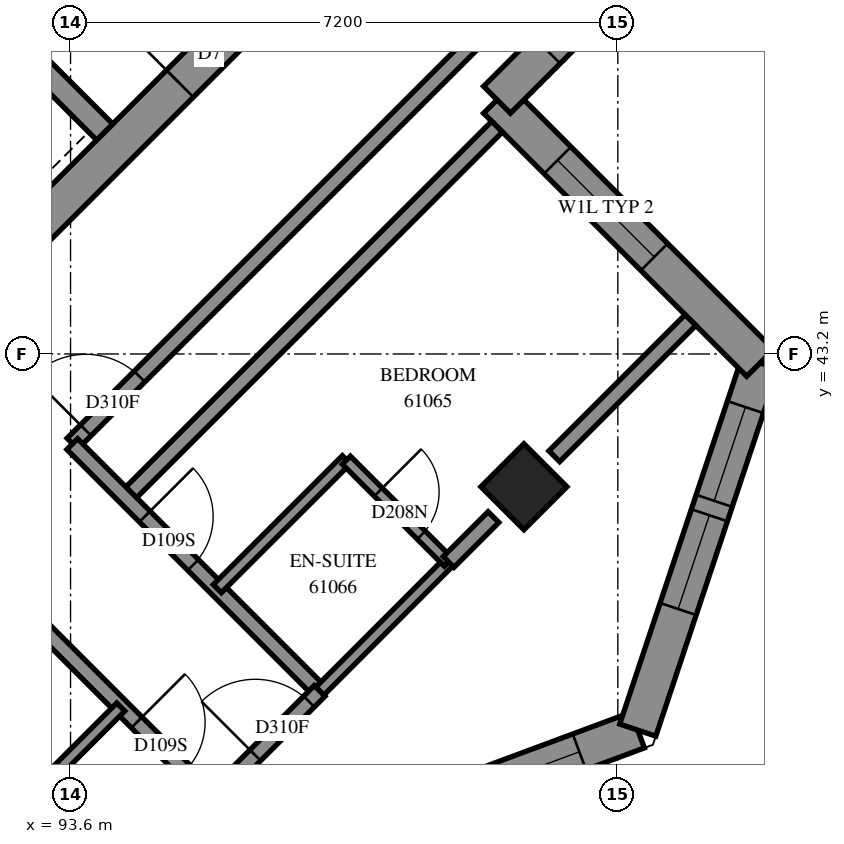
"""IFC4 building model, lengths in metres.
Left out: names, types, materials, properties, quantities, classifications, styles, units other than length and angle.
Written with IfcOpenShell. Run it as: python <this file> out.ifc"""

import sys

from ifc_helpers import new_model, si_unit, direction, frame, frame_2d, origin, origin_2d, place, context, subcontext, project, spatial, polyline, rectangle, outline, extrude, element, fill, save


model = new_model("IFC4")
c1 = context("Model", 3, precision=1e-05, world=origin(), true_north=direction((0.0, 1.0)))
c2 = subcontext(c1, "Body", "Model", "MODEL_VIEW")
j1 = project(units=[si_unit("LENGTHUNIT", "METRE"), si_unit("PLANEANGLEUNIT", "RADIAN")], contexts=[c1])
p1 = place(None, origin())
s1 = spatial("IfcSite", under=j1, at=p1, CompositionType="ELEMENT")
p2 = place(p1, origin())
s2 = spatial("IfcBuilding", under=s1, at=p2, CompositionType="ELEMENT")
p3 = place(p2, frame((0.0, 0.0, 223.6)))
s3 = spatial("IfcBuildingStorey", under=s2, at=p3, CompositionType="ELEMENT", Elevation=223.6)
p4 = place(p3, frame((99.565, 41.453, 0.0), z_axis=(0.0, 0.0, 1.0), x_axis=(0.7071067812, -0.7071067812, 0.0)))
e1 = element("IfcColumn", 1, at=p4, inside=s3, PredefinedType="COLUMN", context=c2, shape_type="SweptSolid", body=[
    extrude(rectangle(XDim=0.8, YDim=0.8, at=origin_2d()), origin(), (0.0, 0.0, 1.0), 3.1),
])
p5 = place(p3, frame((87.013, 38.731, -0.3), z_axis=(0.0, 0.0, 1.0), x_axis=(0.7071067812, 0.7071067812, 0.0)))
e2 = element("IfcWall", 2, at=p5, inside=s3, PredefinedType="SHEAR", context=c2, shape_type="SweptSolid", body=[
    extrude(rectangle(XDim=14.4, YDim=0.5, at=frame_2d((7.2, 0.0))), origin(), (0.0, 0.0, 1.0), 2.7),
])
p6 = place(p5, frame((4.55, 0.0, 0.3)))
e3 = element("IfcOpeningElement", 3, at=p6, cuts=e2, PredefinedType="OPENING", context=c2, shape_type="SweptSolid", body=[
    extrude(rectangle(XDim=1.1, YDim=2.1, at=frame_2d((0.55, 1.05))), frame((0.0, 0.26, 0.0), z_axis=(0.0, -1.0, 0.0), x_axis=(1.0, 0.0, 0.0)), (0.0, 0.0, 1.0), 0.52),
])
p7 = place(p5, frame((11.35, 0.0, 0.3)))
e4 = element("IfcOpeningElement", 4, at=p7, cuts=e2, PredefinedType="OPENING", context=c2, shape_type="SweptSolid", body=[
    extrude(rectangle(XDim=1.1, YDim=2.1, at=frame_2d((0.55, 1.05))), frame((0.0, 0.26, 0.0), z_axis=(0.0, -1.0, 0.0), x_axis=(1.0, 0.0, 0.0)), (0.0, 0.0, 1.0), 0.52),
])
p8 = place(p3, frame((88.958, 51.211, 0.0), z_axis=(0.0, 0.0, 1.0), x_axis=(0.7070998367, -0.7071137256, 0.0)))
e5 = element("IfcWall", 5, at=p8, inside=s3, PredefinedType="SOLIDWALL", context=c2, shape_type="SweptSolid", body=[
    extrude(rectangle(XDim=7.2, YDim=0.3, at=frame_2d((3.6, 0.0))), origin(), (0.0, 0.0, 1.0), 3.1),
])
p9 = place(p3, frame((96.118, 36.415, 0.0), z_axis=(0.0, 0.0, 1.0), x_axis=(0.9374238577, 0.3481903374, 0.0)))
e6 = element("IfcWall", 6, at=p9, inside=s3, PredefinedType="SOLIDWALL", context=c2, shape_type="SweptSolid", body=[
    extrude(outline(polyline([(0.115, -0.25), (5.395, -0.25), (5.155, 0.25), (-0.115, 0.25), (0.115, -0.25)])), origin(), (0.0, 0.0, 1.0), 3.1),
])
p10 = place(p9, frame((1.655, 0.0, 0.45)))
e7 = element("IfcOpeningElement", 7, at=p10, cuts=e6, PredefinedType="OPENING", context=c2, shape_type="SweptSolid", body=[
    extrude(rectangle(XDim=1.3, YDim=2.5, at=frame_2d((0.65, 1.25))), frame((0.0, 0.26, 0.0), z_axis=(0.0, -1.0, 0.0), x_axis=(1.0, 0.0, 0.0)), (0.0, 0.0, 1.0), 0.52),
])
p11 = place(p9, frame((3.155, 0.0, 0.45)))
e8 = element("IfcOpeningElement", 8, at=p11, cuts=e6, PredefinedType="OPENING", context=c2, shape_type="SweptSolid", body=[
    extrude(rectangle(XDim=1.3, YDim=2.5, at=frame_2d((0.65, 1.25))), frame((0.0, 0.26, 0.0), z_axis=(0.0, -1.0, 0.0), x_axis=(1.0, 0.0, 0.0)), (0.0, 0.0, 1.0), 0.52),
])
p12 = place(p3, frame((101.062, 38.252, 0.0), z_axis=(0.0, 0.0, 1.0), x_axis=(0.3162395484, 0.9486793705, 0.0)))
e9 = element("IfcWall", 9, at=p12, inside=s3, PredefinedType="SOLIDWALL", context=c2, shape_type="SweptSolid", body=[
    extrude(outline(polyline([(-0.12, -0.25), (5.247, -0.25), (4.938, 0.25), (0.12, 0.25), (-0.12, -0.25)])), origin(), (0.0, 0.0, 1.0), 3.1),
])
p13 = place(p12, frame((1.68, 0.0, 0.45)))
e10 = element("IfcOpeningElement", 10, at=p13, cuts=e9, PredefinedType="OPENING", context=c2, shape_type="SweptSolid", body=[
    extrude(rectangle(XDim=1.3, YDim=2.5, at=frame_2d((0.65, 1.25))), frame((0.0, 0.26, 0.0), z_axis=(0.0, -1.0, 0.0), x_axis=(1.0, 0.0, 0.0)), (0.0, 0.0, 1.0), 0.52),
])
p14 = place(p12, frame((3.18, 0.0, 0.45)))
e11 = element("IfcOpeningElement", 11, at=p14, cuts=e9, PredefinedType="OPENING", context=c2, shape_type="SweptSolid", body=[
    extrude(rectangle(XDim=1.3, YDim=2.5, at=frame_2d((0.65, 1.25))), frame((0.0, 0.26, 0.0), z_axis=(0.0, -1.0, 0.0), x_axis=(1.0, 0.0, 0.0)), (0.0, 0.0, 1.0), 0.52),
])
p15 = place(p3, frame((102.673, 43.083, 0.0), z_axis=(0.0, 0.0, 1.0), x_axis=(-0.7071067812, 0.7071067812, 0.0)))
e12 = element("IfcWall", 12, at=p15, inside=s3, PredefinedType="SOLIDWALL", context=c2, shape_type="SweptSolid", body=[
    extrude(outline(polyline([(-0.154, -0.25), (4.646, -0.25), (5.146, 0.25), (0.154, 0.25), (-0.154, -0.25)])), origin(), (0.0, 0.0, 1.0), 3.1),
])
p16 = place(p15, frame((1.97, 0.0, 0.6)))
e13 = element("IfcOpeningElement", 13, at=p16, cuts=e12, PredefinedType="OPENING", context=c2, shape_type="SweptSolid", body=[
    extrude(rectangle(XDim=1.8, YDim=1.9, at=frame_2d((0.9, 0.95))), frame((0.0, 0.26, 0.0), z_axis=(0.0, -1.0, 0.0), x_axis=(1.0, 0.0, 0.0)), (0.0, 0.0, 1.0), 0.52),
])
p17 = place(p3, frame((99.211, 46.544, 0.0), z_axis=(0.0, 0.0, 1.0), x_axis=(0.7071152597, 0.7070983025, 0.0)))
e14 = element("IfcWall", 14, at=p17, inside=s3, PredefinedType="SOLIDWALL", context=c2, shape_type="SweptSolid", body=[
    extrude(outline(polyline([(0.25, -0.25), (6.253, -0.25), (5.541, 0.25), (-0.25, 0.25), (0.25, -0.25)])), origin(), (0.0, 0.0, 1.0), 3.1),
])
p18 = place(p17, frame((0.925, 0.0, 0.6)))
e15 = element("IfcOpeningElement", 15, at=p18, cuts=e14, PredefinedType="OPENING", context=c2, shape_type="SweptSolid", body=[
    extrude(rectangle(XDim=1.8, YDim=1.9, at=frame_2d((0.9, 0.95))), frame((0.0, 0.26, 0.0), z_axis=(0.0, -1.0, 0.0), x_axis=(1.0, 0.0, 0.0)), (0.0, 0.0, 1.0), 0.52),
])
p19 = place(p17, frame((3.996, 0.0, 0.6)))
e16 = element("IfcOpeningElement", 16, at=p19, cuts=e14, PredefinedType="OPENING", context=c2, shape_type="SweptSolid", body=[
    extrude(rectangle(XDim=1.2, YDim=1.9, at=frame_2d((0.6, 0.95))), frame((0.0, 0.26, 0.0), z_axis=(0.0, -1.0, 0.0), x_axis=(1.0, 0.0, 0.0)), (0.0, 0.0, 1.0), 0.52),
])
p20 = place(p3, frame((93.625, 42.021, 0.0), z_axis=(0.0, 0.0, 1.0), x_axis=(0.7071067812, 0.7071067812, 0.0)))
e17 = element("IfcWall", 17, at=p20, inside=s3, PredefinedType="PARTITIONING", context=c2, shape_type="SweptSolid", body=[
    extrude(rectangle(XDim=9.998, YDim=0.2, at=frame_2d((4.999, 0.0))), origin(), (0.0, 0.0, 1.0), 3.1),
])
p21 = place(p20, frame((0.248, 0.0, 0.0)))
e18 = element("IfcOpeningElement", 18, at=p21, cuts=e17, PredefinedType="OPENING", context=c2, shape_type="SweptSolid", body=[
    extrude(rectangle(XDim=1.0, YDim=2.1, at=frame_2d((0.5, 1.05))), frame((0.0, 0.11, 0.0), z_axis=(0.0, -1.0, 0.0), x_axis=(1.0, 0.0, 0.0)), (0.0, 0.0, 1.0), 0.22),
])
p22 = place(p3, frame((94.331, 41.313, 0.0), z_axis=(0.0, 0.0, 1.0), x_axis=(0.7072516979, 0.7069618347, 0.0)))
e19 = element("IfcWall", 19, at=p22, inside=s3, PredefinedType="PARTITIONING", context=c2, shape_type="SweptSolid", body=[
    extrude(rectangle(XDim=6.9, YDim=0.2, at=frame_2d((3.45, 0.0))), origin(), (0.0, 0.0, 1.0), 3.1),
])
p23 = place(p3, frame((93.623, 42.015, 0.0), z_axis=(0.0, 0.0, 1.0), x_axis=(0.7071067812, -0.7071067812, 0.0)))
e20 = element("IfcWall", 20, at=p23, inside=s3, PredefinedType="PARTITIONING", context=c2, shape_type="SweptSolid", body=[
    extrude(rectangle(XDim=4.599, YDim=0.2, at=frame_2d((2.3, 0.0))), origin(), (0.0, 0.0, 1.0), 3.1),
])
p24 = place(p23, frame((1.349, 0.0, 0.0)))
e21 = element("IfcOpeningElement", 21, at=p24, cuts=e20, PredefinedType="OPENING", context=c2, shape_type="SweptSolid", body=[
    extrude(rectangle(XDim=0.9, YDim=2.1, at=frame_2d((0.45, 1.05))), frame((0.0, 0.11, 0.0), z_axis=(0.0, -1.0, 0.0), x_axis=(1.0, 0.0, 0.0)), (0.0, 0.0, 1.0), 0.22),
])
p25 = place(p3, frame((92.216, 40.608, 0.0), z_axis=(0.0, 0.0, 1.0), x_axis=(0.7071067812, -0.7071067812, 0.0)))
e22 = element("IfcWall", 22, at=p25, inside=s3, PredefinedType="PARTITIONING", context=c2, shape_type="SweptSolid", body=[
    extrude(rectangle(XDim=4.599, YDim=0.2, at=frame_2d((2.3, 0.0))), origin(), (0.0, 0.0, 1.0), 3.1),
])
p26 = place(p25, frame((3.189, 0.0, 0.0)))
e23 = element("IfcOpeningElement", 23, at=p26, cuts=e22, PredefinedType="OPENING", context=c2, shape_type="SweptSolid", body=[
    extrude(rectangle(XDim=0.9, YDim=2.1, at=frame_2d((0.45, 1.05))), frame((0.0, 0.11, 0.0), z_axis=(0.0, -1.0, 0.0), x_axis=(1.0, 0.0, 0.0)), (0.0, 0.0, 1.0), 0.22),
])
p27 = place(p3, frame((99.964, 41.854, 0.0), z_axis=(0.0, 0.0, 1.0), x_axis=(0.7071265121, 0.7070870497, 0.0)))
e24 = element("IfcWall", 24, at=p27, inside=s3, PredefinedType="PARTITIONING", context=c2, shape_type="SweptSolid", body=[
    extrude(rectangle(XDim=2.534, YDim=0.2, at=frame_2d((1.267, 0.0))), origin(), (0.0, 0.0, 1.0), 3.1),
])
p28 = place(p3, frame((92.563, 36.857, 0.0), z_axis=(0.0, 0.0, 1.0), x_axis=(0.7071067812, 0.7071067812, 0.0)))
e25 = element("IfcWall", 25, at=p28, inside=s3, PredefinedType="PARTITIONING", context=c2, shape_type="SweptSolid", body=[
    extrude(rectangle(XDim=2.401, YDim=0.15, at=frame_2d((1.201, 0.0))), origin(), (0.0, 0.0, 1.0), 3.1),
])
p29 = place(p3, frame((96.879, 38.764, 0.0), z_axis=(0.0, 0.0, 1.0), x_axis=(0.706689978, 0.7075233388, 0.0)))
e26 = element("IfcWall", 26, at=p29, inside=s3, PredefinedType="PARTITIONING", context=c2, shape_type="SweptSolid", body=[
    extrude(rectangle(XDim=2.4, YDim=0.15, at=frame_2d((1.2, 0.0))), origin(), (0.0, 0.0, 1.0), 2.6),
])
p30 = place(p3, frame((95.531, 40.113, 0.0), z_axis=(0.0, 0.0, 1.0), x_axis=(0.7075233388, 0.706689978, 0.0)))
e27 = element("IfcWall", 27, at=p30, inside=s3, PredefinedType="PARTITIONING", context=c2, shape_type="SweptSolid", body=[
    extrude(rectangle(XDim=2.4, YDim=0.15, at=frame_2d((1.2, 0.0))), origin(), (0.0, 0.0, 1.0), 3.1),
])
p31 = place(p3, frame((95.463, 37.353, 0.0), z_axis=(0.0, 0.0, 1.0), x_axis=(0.7071067812, 0.7071067812, 0.0)))
e28 = element("IfcWall", 28, at=p31, inside=s3, PredefinedType="PARTITIONING", context=c2, shape_type="SweptSolid", body=[
    extrude(rectangle(XDim=2.0, YDim=0.2, at=frame_2d((1.0, 0.0))), origin(), (0.0, 0.0, 1.0), 2.6),
])
p32 = place(p31, frame((0.802, 0.0, 0.0)))
e29 = element("IfcOpeningElement", 29, at=p32, cuts=e28, PredefinedType="OPENING", context=c2, shape_type="SweptSolid", body=[
    extrude(rectangle(XDim=1.0, YDim=2.1, at=frame_2d((0.5, 1.05))), frame((0.0, 0.11, 0.0), z_axis=(0.0, -1.0, 0.0), x_axis=(1.0, 0.0, 0.0)), (0.0, 0.0, 1.0), 0.22),
])
p33 = place(p3, frame((97.229, 41.803, 0.0), z_axis=(0.0, 0.0, 1.0), x_axis=(0.7071067812, -0.7071067812, 0.0)))
e30 = element("IfcWall", 30, at=p33, inside=s3, PredefinedType="PARTITIONING", context=c2, shape_type="SweptSolid", body=[
    extrude(rectangle(XDim=1.898, YDim=0.15, at=frame_2d((0.949, 0.0))), origin(), (0.0, 0.0, 1.0), 3.1),
])
p34 = place(p33, frame((0.594, 0.0, 0.0)))
e31 = element("IfcOpeningElement", 31, at=p34, cuts=e30, PredefinedType="OPENING", context=c2, shape_type="SweptSolid", body=[
    extrude(rectangle(XDim=0.8, YDim=2.1, at=frame_2d((0.4, 1.05))), frame((0.0, 0.085, 0.0), z_axis=(0.0, -1.0, 0.0), x_axis=(1.0, 0.0, 0.0)), (0.0, 0.0, 1.0), 0.17),
])
p35 = place(p3, frame((98.574, 40.464, 0.0), z_axis=(0.0, 0.0, 1.0), x_axis=(0.7071067812, 0.7071067812, 0.0)))
e32 = element("IfcWall", 32, at=p35, inside=s3, PredefinedType="PARTITIONING", context=c2, shape_type="SweptSolid", body=[
    extrude(rectangle(XDim=0.834, YDim=0.2, at=frame_2d((0.417, 0.0))), origin(), (0.0, 0.0, 1.0), 2.6),
])
p36 = place(p11, origin())
e33 = element("IfcWindow", 33, at=p36, inside=s3, PartitioningType="SINGLE_PANEL", PredefinedType="WINDOW", context=c2, shape_type="SweptSolid", body=[
    extrude(rectangle(XDim=1.3, YDim=2.5, at=frame_2d((0.65, 1.25))), frame((0.0, 0.18, 0.0), z_axis=(0.0, -1.0, 0.0), x_axis=(1.0, 0.0, 0.0)), (0.0, 0.0, 1.0), 0.06),
])
fill(e8, e33)
p37 = place(p13, origin())
e34 = element("IfcWindow", 34, at=p37, inside=s3, PartitioningType="SINGLE_PANEL", PredefinedType="WINDOW", context=c2, shape_type="SweptSolid", body=[
    extrude(rectangle(XDim=1.3, YDim=2.5, at=frame_2d((0.65, 1.25))), frame((0.0, 0.18, 0.0), z_axis=(0.0, -1.0, 0.0), x_axis=(1.0, 0.0, 0.0)), (0.0, 0.0, 1.0), 0.06),
])
fill(e10, e34)
p38 = place(p14, origin())
e35 = element("IfcWindow", 35, at=p38, inside=s3, PartitioningType="SINGLE_PANEL", PredefinedType="WINDOW", context=c2, shape_type="SweptSolid", body=[
    extrude(rectangle(XDim=1.3, YDim=2.5, at=frame_2d((0.65, 1.25))), frame((0.0, 0.18, 0.0), z_axis=(0.0, -1.0, 0.0), x_axis=(1.0, 0.0, 0.0)), (0.0, 0.0, 1.0), 0.06),
])
fill(e11, e35)
p39 = place(p16, origin())
e36 = element("IfcWindow", 36, at=p39, inside=s3, PartitioningType="SINGLE_PANEL", PredefinedType="WINDOW", context=c2, shape_type="SweptSolid", body=[
    extrude(rectangle(XDim=1.8, YDim=1.9, at=frame_2d((0.9, 0.95))), frame((0.0, 0.18, 0.0), z_axis=(0.0, -1.0, 0.0), x_axis=(1.0, 0.0, 0.0)), (0.0, 0.0, 1.0), 0.06),
])
fill(e13, e36)
p40 = place(p7, origin())
e37 = element("IfcDoor", 37, at=p40, inside=s3, OperationType="SINGLE_SWING_RIGHT", PredefinedType="DOOR", context=c2, shape_type="SweptSolid", body=[
    extrude(rectangle(XDim=1.1, YDim=2.1, at=frame_2d((0.55, 1.05))), frame((0.0, 0.025, 0.0), z_axis=(0.0, -1.0, 0.0), x_axis=(1.0, 0.0, 0.0)), (0.0, 0.0, 1.0), 0.05),
])
fill(e4, e37)
p41 = place(p21, origin())
e38 = element("IfcDoor", 38, at=p41, inside=s3, OperationType="SINGLE_SWING_LEFT", PredefinedType="DOOR", context=c2, shape_type="SweptSolid", body=[
    extrude(rectangle(XDim=1.0, YDim=2.1, at=frame_2d((0.5, 1.05))), frame((0.0, 0.025, 0.0), z_axis=(0.0, -1.0, 0.0), x_axis=(1.0, 0.0, 0.0)), (0.0, 0.0, 1.0), 0.05),
])
fill(e18, e38)
p42 = place(p24, origin())
e39 = element("IfcDoor", 39, at=p42, inside=s3, OperationType="SINGLE_SWING_RIGHT", PredefinedType="DOOR", context=c2, shape_type="SweptSolid", body=[
    extrude(rectangle(XDim=0.9, YDim=2.1, at=frame_2d((0.45, 1.05))), frame((0.0, 0.025, 0.0), z_axis=(0.0, -1.0, 0.0), x_axis=(1.0, 0.0, 0.0)), (0.0, 0.0, 1.0), 0.05),
])
fill(e21, e39)
p43 = place(p34, origin())
e40 = element("IfcDoor", 40, at=p43, inside=s3, OperationType="SINGLE_SWING_RIGHT", PredefinedType="DOOR", context=c2, shape_type="SweptSolid", body=[
    extrude(rectangle(XDim=0.8, YDim=2.1, at=frame_2d((0.4, 1.05))), frame((0.0, 0.025, 0.0), z_axis=(0.0, -1.0, 0.0), x_axis=(1.0, 0.0, 0.0)), (0.0, 0.0, 1.0), 0.05),
])
fill(e31, e40)
p44 = place(p26, origin())
e41 = element("IfcDoor", 41, at=p44, inside=s3, OperationType="SINGLE_SWING_LEFT", PredefinedType="DOOR", context=c2, shape_type="SweptSolid", body=[
    extrude(rectangle(XDim=0.9, YDim=2.1, at=frame_2d((0.45, 1.05))), frame((0.0, 0.025, 0.0), z_axis=(0.0, -1.0, 0.0), x_axis=(1.0, 0.0, 0.0)), (0.0, 0.0, 1.0), 0.05),
])
fill(e23, e41)
p45 = place(p32, origin())
e42 = element("IfcDoor", 42, at=p45, inside=s3, OperationType="SINGLE_SWING_RIGHT", PredefinedType="DOOR", context=c2, shape_type="SweptSolid", body=[
    extrude(rectangle(XDim=1.0, YDim=2.1, at=frame_2d((0.5, 1.05))), frame((0.0, 0.025, 0.0), z_axis=(0.0, -1.0, 0.0), x_axis=(1.0, 0.0, 0.0)), (0.0, 0.0, 1.0), 0.05),
])
fill(e29, e42)
save(model, sys.argv[1])
